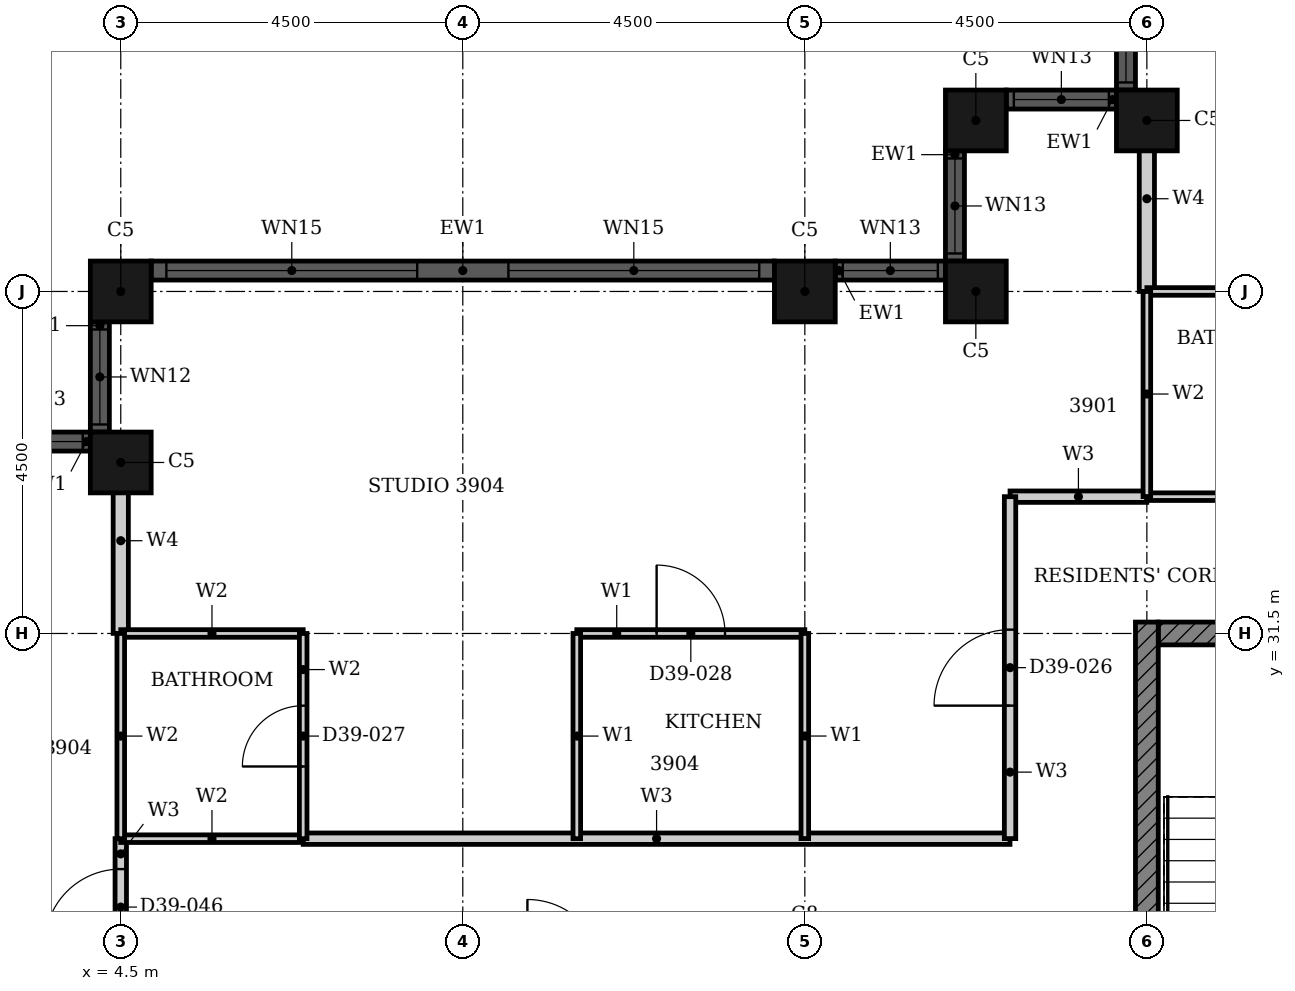
"""IFC4 building model, lengths in metres.
Left out: names, types, materials, properties, quantities, classifications, styles, units other than length and angle.
Written with IfcOpenShell. Run it as: python <this file> out.ifc"""

import sys

from ifc_helpers import new_model, si_unit, direction, frame, frame_2d, origin, origin_2d, place, context, subcontext, project, spatial, rectangle, hollow_rectangle, extrude, element, fill, save


model = new_model("IFC4")
c1 = context("Model", 3, precision=1e-05, world=origin(), true_north=direction((0.0, 1.0)))
c2 = subcontext(c1, "Body", "Model", "MODEL_VIEW")
j1 = project(units=[si_unit("LENGTHUNIT", "METRE"), si_unit("PLANEANGLEUNIT", "RADIAN")], contexts=[c1])
p1 = place(None, origin())
s1 = spatial("IfcSite", under=j1, at=p1, CompositionType="ELEMENT")
p2 = place(p1, origin())
s2 = spatial("IfcBuilding", under=s1, at=p2, CompositionType="ELEMENT")
p3 = place(p2, frame((0.0, 0.0, 158.0)))
s3 = spatial("IfcBuildingStorey", under=s2, at=p3, CompositionType="ELEMENT", Elevation=158.0)
for number, where, z_axis, x_axis in (
    (1, (18.0, 38.25, 0.0), (0.0, 0.0, 1.0), (1.0, 0.0, 0.0)),
    (2, (15.75, 38.25, 0.0), (0.0, 0.0, 1.0), (1.0, 0.0, 0.0)),
    (3, (15.75, 36.0, 0.0), (0.0, 0.0, 1.0), (1.0, 0.0, 0.0)),
    (4, (13.5, 36.0, 0.0), (0.0, 0.0, 1.0), (1.0, 0.0, 0.0)),
    (5, (4.5, 36.0, 0.0), (0.0, 0.0, 1.0), (1.0, 0.0, 0.0)),
    (6, (4.5, 33.75, 0.0), (0.0, 0.0, 1.0), (1.0, 0.0, 0.0)),
):
    element("IfcColumn", number, at=place(p3, frame(where, z_axis=z_axis, x_axis=x_axis)), inside=s3, PredefinedType="COLUMN", context=c2, shape_type="SweptSolid", body=[
        extrude(hollow_rectangle(XDim=0.8, YDim=0.8, WallThickness=0.025, at=origin_2d()), origin(), (0.0, 0.0, 1.0), 3.7),
    ])
p4 = place(p3, frame((17.725, 40.1, 0.0), z_axis=(0.0, 0.0, 1.0), x_axis=(0.0, -1.0, 0.0)))
e7 = element("IfcWall", 7, at=p4, inside=s3, PredefinedType="SOLIDWALL", context=c2, shape_type="SweptSolid", body=[
    extrude(rectangle(XDim=1.45, YDim=0.25, at=frame_2d((0.725, 0.0))), origin(), (0.0, 0.0, 1.0), 3.7),
])
p5 = place(p4, frame((0.1, 0.0, 0.9)))
e8 = element("IfcOpeningElement", 8, at=p5, cuts=e7, PredefinedType="OPENING", context=c2, shape_type="SweptSolid", body=[
    extrude(rectangle(XDim=1.25, YDim=1.85, at=frame_2d((0.625, 0.925))), frame((0.0, 0.135, 0.0), z_axis=(0.0, -1.0, 0.0), x_axis=(1.0, 0.0, 0.0)), (0.0, 0.0, 1.0), 0.27),
])
p6 = place(p3, frame((17.6, 38.525, 0.0), z_axis=(0.0, 0.0, 1.0), x_axis=(-1.0, 0.0, 0.0)))
e9 = element("IfcWall", 9, at=p6, inside=s3, PredefinedType="SOLIDWALL", context=c2, shape_type="SweptSolid", body=[
    extrude(rectangle(XDim=1.45, YDim=0.25, at=frame_2d((0.725, 0.0))), origin(), (0.0, 0.0, 1.0), 3.7),
])
p7 = place(p6, frame((0.1, 0.0, 0.9)))
e10 = element("IfcOpeningElement", 10, at=p7, cuts=e9, PredefinedType="OPENING", context=c2, shape_type="SweptSolid", body=[
    extrude(rectangle(XDim=1.25, YDim=1.85, at=frame_2d((0.625, 0.925))), frame((0.0, 0.135, 0.0), z_axis=(0.0, -1.0, 0.0), x_axis=(1.0, 0.0, 0.0)), (0.0, 0.0, 1.0), 0.27),
])
p8 = place(p3, frame((15.475, 37.85, 0.0), z_axis=(0.0, 0.0, 1.0), x_axis=(0.0, -1.0, 0.0)))
e11 = element("IfcWall", 11, at=p8, inside=s3, PredefinedType="SOLIDWALL", context=c2, shape_type="SweptSolid", body=[
    extrude(rectangle(XDim=1.45, YDim=0.25, at=frame_2d((0.725, 0.0))), origin(), (0.0, 0.0, 1.0), 3.7),
])
p9 = place(p8, frame((0.1, 0.0, 0.9)))
e12 = element("IfcOpeningElement", 12, at=p9, cuts=e11, PredefinedType="OPENING", context=c2, shape_type="SweptSolid", body=[
    extrude(rectangle(XDim=1.25, YDim=1.85, at=frame_2d((0.625, 0.925))), frame((0.0, 0.135, 0.0), z_axis=(0.0, -1.0, 0.0), x_axis=(1.0, 0.0, 0.0)), (0.0, 0.0, 1.0), 0.27),
])
p10 = place(p3, frame((15.35, 36.275, 0.0), z_axis=(0.0, 0.0, 1.0), x_axis=(-1.0, 0.0, 0.0)))
e13 = element("IfcWall", 13, at=p10, inside=s3, PredefinedType="SOLIDWALL", context=c2, shape_type="SweptSolid", body=[
    extrude(rectangle(XDim=1.45, YDim=0.25, at=frame_2d((0.725, 0.0))), origin(), (0.0, 0.0, 1.0), 3.7),
])
p11 = place(p10, frame((0.1, 0.0, 0.9)))
e14 = element("IfcOpeningElement", 14, at=p11, cuts=e13, PredefinedType="OPENING", context=c2, shape_type="SweptSolid", body=[
    extrude(rectangle(XDim=1.25, YDim=1.85, at=frame_2d((0.625, 0.925))), frame((0.0, 0.135, 0.0), z_axis=(0.0, -1.0, 0.0), x_axis=(1.0, 0.0, 0.0)), (0.0, 0.0, 1.0), 0.27),
])
p12 = place(p3, frame((13.1, 36.275, 0.0), z_axis=(0.0, 0.0, 1.0), x_axis=(-1.0, 0.0, 0.0)))
e15 = element("IfcWall", 15, at=p12, inside=s3, PredefinedType="SOLIDWALL", context=c2, shape_type="SweptSolid", body=[
    extrude(rectangle(XDim=8.2, YDim=0.25, at=frame_2d((4.1, 0.0))), origin(), (0.0, 0.0, 1.0), 3.7),
])
p13 = place(p12, frame((0.2, 0.0, 0.45)))
e16 = element("IfcOpeningElement", 16, at=p13, cuts=e15, PredefinedType="OPENING", context=c2, shape_type="SweptSolid", body=[
    extrude(rectangle(XDim=3.3, YDim=2.3, at=frame_2d((1.65, 1.15))), frame((0.0, 0.135, 0.0), z_axis=(0.0, -1.0, 0.0), x_axis=(1.0, 0.0, 0.0)), (0.0, 0.0, 1.0), 0.27),
])
p14 = place(p12, frame((4.7, 0.0, 0.45)))
e17 = element("IfcOpeningElement", 17, at=p14, cuts=e15, PredefinedType="OPENING", context=c2, shape_type="SweptSolid", body=[
    extrude(rectangle(XDim=3.3, YDim=2.3, at=frame_2d((1.65, 1.15))), frame((0.0, 0.135, 0.0), z_axis=(0.0, -1.0, 0.0), x_axis=(1.0, 0.0, 0.0)), (0.0, 0.0, 1.0), 0.27),
])
p15 = place(p3, frame((4.225, 35.6, 0.0), z_axis=(0.0, 0.0, 1.0), x_axis=(0.0, -1.0, 0.0)))
e18 = element("IfcWall", 18, at=p15, inside=s3, PredefinedType="SOLIDWALL", context=c2, shape_type="SweptSolid", body=[
    extrude(rectangle(XDim=1.45, YDim=0.25, at=frame_2d((0.725, 0.0))), origin(), (0.0, 0.0, 1.0), 3.7),
])
p16 = place(p15, frame((0.1, 0.0, 0.9)))
e19 = element("IfcOpeningElement", 19, at=p16, cuts=e18, PredefinedType="OPENING", context=c2, shape_type="SweptSolid", body=[
    extrude(rectangle(XDim=1.25, YDim=2.08, at=frame_2d((0.625, 1.04))), frame((0.0, 0.135, 0.0), z_axis=(0.0, -1.0, 0.0), x_axis=(1.0, 0.0, 0.0)), (0.0, 0.0, 1.0), 0.27),
])
p17 = place(p3, frame((4.1, 34.025, 0.0), z_axis=(0.0, 0.0, 1.0), x_axis=(-1.0, 0.0, 0.0)))
e20 = element("IfcWall", 20, at=p17, inside=s3, PredefinedType="SOLIDWALL", context=c2, shape_type="SweptSolid", body=[
    extrude(rectangle(XDim=1.45, YDim=0.25, at=frame_2d((0.725, 0.0))), origin(), (0.0, 0.0, 1.0), 3.7),
])
p18 = place(p17, frame((0.1, 0.0, 0.9)))
e21 = element("IfcOpeningElement", 21, at=p18, cuts=e20, PredefinedType="OPENING", context=c2, shape_type="SweptSolid", body=[
    extrude(rectangle(XDim=1.25, YDim=1.85, at=frame_2d((0.625, 0.925))), frame((0.0, 0.135, 0.0), z_axis=(0.0, -1.0, 0.0), x_axis=(1.0, 0.0, 0.0)), (0.0, 0.0, 1.0), 0.27),
])
p19 = place(p3, frame((18.15, 31.5, 0.0), z_axis=(0.0, 0.0, 1.0), x_axis=(1.0, 0.0, 0.0)))
e22 = element("IfcWall", 22, at=p19, inside=s3, PredefinedType="SHEAR", context=c2, shape_type="SweptSolid", body=[
    extrude(rectangle(XDim=9.368, YDim=0.3, at=frame_2d((4.684, 0.0))), origin(), (0.0, 0.0, 1.0), 3.4),
])
p20 = place(p19, frame((4.736, 0.0, 0.0)))
e23 = element("IfcOpeningElement", 23, at=p20, cuts=e22, PredefinedType="OPENING", context=c2, shape_type="SweptSolid", body=[
    extrude(rectangle(XDim=1.8, YDim=2.1, at=frame_2d((0.9, 1.05))), frame((0.0, 0.16, 0.0), z_axis=(0.0, -1.0, 0.0), x_axis=(1.0, 0.0, 0.0)), (0.0, 0.0, 1.0), 0.32),
])
p21 = place(p3, frame((18.0, 22.35, 0.0), z_axis=(0.0, 0.0, 1.0), x_axis=(0.0, 1.0, 0.0)))
e24 = element("IfcWall", 24, at=p21, inside=s3, PredefinedType="SHEAR", context=c2, shape_type="SweptSolid", body=[
    extrude(rectangle(XDim=9.3, YDim=0.3, at=frame_2d((4.65, 0.0))), origin(), (0.0, 0.0, 1.0), 3.4),
])
p22 = place(p3, frame((6.9, 28.8, 0.0), z_axis=(0.0, 0.0, 1.0), x_axis=(1.0, 0.0, 0.0)))
e25 = element("IfcWall", 25, at=p22, inside=s3, PredefinedType="PARTITIONING", context=c2, shape_type="SweptSolid", body=[
    extrude(rectangle(XDim=9.299, YDim=0.15, at=frame_2d((4.649, 0.0))), origin(), (0.0, 0.0, 1.0), 3.4),
])
p23 = place(p3, frame((16.2, 33.3, 0.0), z_axis=(0.0, 0.0, 1.0), x_axis=(1.0, 0.0, 0.0)))
e26 = element("IfcWall", 26, at=p23, inside=s3, PredefinedType="PARTITIONING", context=c2, shape_type="SweptSolid", body=[
    extrude(rectangle(XDim=1.799, YDim=0.15, at=frame_2d((0.899, 0.0))), origin(), (0.0, 0.0, 1.0), 3.4),
])
p24 = place(p3, frame((16.2, 28.801, 0.0), z_axis=(0.0, 0.0, 1.0), x_axis=(0.0, 1.0, 0.0)))
e27 = element("IfcWall", 27, at=p24, inside=s3, PredefinedType="PARTITIONING", context=c2, shape_type="SweptSolid", body=[
    extrude(rectangle(XDim=4.499, YDim=0.15, at=frame_2d((2.25, 0.0))), origin(), (0.0, 0.0, 1.0), 3.4),
])
p25 = place(p24, frame((1.75, 0.0, 0.0)))
e28 = element("IfcOpeningElement", 28, at=p25, cuts=e27, PredefinedType="OPENING", context=c2, shape_type="SweptSolid", body=[
    extrude(rectangle(XDim=1.0, YDim=2.2, at=frame_2d((0.5, 1.1))), frame((0.0, 0.085, 0.0), z_axis=(0.0, -1.0, 0.0), x_axis=(1.0, 0.0, 0.0)), (0.0, 0.0, 1.0), 0.17),
])
p26 = place(p3, frame((4.5, 27.0, 0.0), z_axis=(0.0, 0.0, 1.0), x_axis=(0.0, 1.0, 0.0)))
e29 = element("IfcWall", 29, at=p26, inside=s3, PredefinedType="PARTITIONING", context=c2, shape_type="SweptSolid", body=[
    extrude(rectangle(XDim=1.8, YDim=0.15, at=frame_2d((0.9, 0.0))), origin(), (0.0, 0.0, 1.0), 3.4),
])
p27 = place(p26, frame((0.4, 0.0, 0.0)))
e30 = element("IfcOpeningElement", 30, at=p27, cuts=e29, PredefinedType="OPENING", context=c2, shape_type="SweptSolid", body=[
    extrude(rectangle(XDim=1.0, YDim=2.2, at=frame_2d((0.5, 1.1))), frame((0.0, 0.085, 0.0), z_axis=(0.0, -1.0, 0.0), x_axis=(1.0, 0.0, 0.0)), (0.0, 0.0, 1.0), 0.17),
])
p28 = place(p3, frame((10.5, 31.5, 0.0), z_axis=(0.0, 0.0, 1.0), x_axis=(1.0, 0.0, 0.0)))
e31 = element("IfcWall", 31, at=p28, inside=s3, PredefinedType="PARTITIONING", context=c2, shape_type="SweptSolid", body=[
    extrude(rectangle(XDim=3.0, YDim=0.1, at=frame_2d((1.5, 0.0))), origin(), (0.0, 0.0, 1.0), 2.68),
])
p29 = place(p28, frame((1.05, 0.0, 0.0)))
e32 = element("IfcOpeningElement", 32, at=p29, cuts=e31, PredefinedType="OPENING", context=c2, shape_type="SweptSolid", body=[
    extrude(rectangle(XDim=0.9, YDim=2.1, at=frame_2d((0.45, 1.05))), frame((0.0, 0.06, 0.0), z_axis=(0.0, -1.0, 0.0), x_axis=(1.0, 0.0, 0.0)), (0.0, 0.0, 1.0), 0.12),
])
p30 = place(p3, frame((10.5, 28.8, 0.0), z_axis=(0.0, 0.0, 1.0), x_axis=(0.0, 1.0, 0.0)))
e33 = element("IfcWall", 33, at=p30, inside=s3, PredefinedType="PARTITIONING", context=c2, shape_type="SweptSolid", body=[
    extrude(rectangle(XDim=2.7, YDim=0.1, at=frame_2d((1.35, 0.0))), origin(), (0.0, 0.0, 1.0), 3.4),
])
p31 = place(p3, frame((13.5, 28.801, 0.0), z_axis=(0.0, 0.0, 1.0), x_axis=(0.0, 1.0, 0.0)))
e34 = element("IfcWall", 34, at=p31, inside=s3, PredefinedType="PARTITIONING", context=c2, shape_type="SweptSolid", body=[
    extrude(rectangle(XDim=2.699, YDim=0.1, at=frame_2d((1.35, 0.0))), origin(), (0.0, 0.0, 1.0), 2.48),
])
p32 = place(p3, frame((18.0, 36.0, 0.0), z_axis=(0.0, 0.0, 1.0), x_axis=(0.0, 1.0, 0.0)))
e35 = element("IfcWall", 35, at=p32, inside=s3, PredefinedType="PARTITIONING", context=c2, shape_type="SweptSolid", body=[
    extrude(rectangle(XDim=2.44, YDim=0.2, at=frame_2d((1.22, 0.0))), origin(), (0.0, 0.0, 1.0), 3.4),
])
p33 = place(p3, frame((4.5, 31.501, 0.0), z_axis=(0.0, 0.0, 1.0), x_axis=(0.0, 1.0, 0.0)))
e36 = element("IfcWall", 36, at=p33, inside=s3, PredefinedType="PARTITIONING", context=c2, shape_type="SweptSolid", body=[
    extrude(rectangle(XDim=2.439, YDim=0.2, at=frame_2d((1.219, 0.0))), origin(), (0.0, 0.0, 1.0), 3.4),
])
p34 = place(p3, frame((4.5, 28.8, 0.0), z_axis=(0.0, 0.0, 1.0), x_axis=(1.0, 0.0, 0.0)))
e37 = element("IfcWall", 37, at=p34, inside=s3, PredefinedType="PARTITIONING", context=c2, shape_type="SweptSolid", body=[
    extrude(rectangle(XDim=2.4, YDim=0.1, at=frame_2d((1.2, 0.0))), origin(), (0.0, 0.0, 1.0), 3.4),
])
p35 = place(p3, frame((4.5, 31.5, 0.0), z_axis=(0.0, 0.0, 1.0), x_axis=(1.0, 0.0, 0.0)))
e38 = element("IfcWall", 38, at=p35, inside=s3, PredefinedType="PARTITIONING", context=c2, shape_type="SweptSolid", body=[
    extrude(rectangle(XDim=2.4, YDim=0.1, at=frame_2d((1.2, 0.0))), origin(), (0.0, 0.0, 1.0), 2.68),
])
for number, where, z_axis, x_axis in (
    (39, (18.0, 33.3, 0.0), (0.0, 0.0, 1.0), (1.0, 0.0, 0.0)),
    (40, (18.0, 36.0, 0.0), (0.0, 0.0, 1.0), (1.0, 0.0, 0.0)),
):
    element("IfcWall", number, at=place(p3, frame(where, z_axis=z_axis, x_axis=x_axis)), inside=s3, PredefinedType="PARTITIONING", context=c2, shape_type="SweptSolid", body=[
        extrude(rectangle(XDim=2.4, YDim=0.1, at=frame_2d((1.2, 0.0))), origin(), (0.0, 0.0, 1.0), 3.4),
    ])
p36 = place(p3, frame((18.0, 33.301, 0.0), z_axis=(0.0, 0.0, 1.0), x_axis=(0.0, 1.0, 0.0)))
e41 = element("IfcWall", 41, at=p36, inside=s3, PredefinedType="PARTITIONING", context=c2, shape_type="SweptSolid", body=[
    extrude(rectangle(XDim=2.699, YDim=0.1, at=frame_2d((1.35, 0.0))), origin(), (0.0, 0.0, 1.0), 3.4),
])
p37 = place(p3, frame((4.5, 28.8, 0.0), z_axis=(0.0, 0.0, 1.0), x_axis=(0.0, 1.0, 0.0)))
e42 = element("IfcWall", 42, at=p37, inside=s3, PredefinedType="PARTITIONING", context=c2, shape_type="SweptSolid", body=[
    extrude(rectangle(XDim=2.7, YDim=0.1, at=frame_2d((1.35, 0.0))), origin(), (0.0, 0.0, 1.0), 3.4),
])
p38 = place(p3, frame((6.9, 28.8, 0.0), z_axis=(0.0, 0.0, 1.0), x_axis=(0.0, 1.0, 0.0)))
e43 = element("IfcWall", 43, at=p38, inside=s3, PredefinedType="PARTITIONING", context=c2, shape_type="SweptSolid", body=[
    extrude(rectangle(XDim=2.7, YDim=0.1, at=frame_2d((1.35, 0.0))), origin(), (0.0, 0.0, 1.0), 3.4),
])
p39 = place(p38, frame((0.95, 0.0, 0.0)))
e44 = element("IfcOpeningElement", 44, at=p39, cuts=e43, PredefinedType="OPENING", context=c2, shape_type="SweptSolid", body=[
    extrude(rectangle(XDim=0.8, YDim=2.1, at=frame_2d((0.4, 1.05))), frame((0.0, 0.06, 0.0), z_axis=(0.0, -1.0, 0.0), x_axis=(1.0, 0.0, 0.0)), (0.0, 0.0, 1.0), 0.12),
])
p40 = place(p5, origin())
e45 = element("IfcWindow", 45, at=p40, inside=s3, PartitioningType="SINGLE_PANEL", PredefinedType="WINDOW", context=c2, shape_type="SweptSolid", body=[
    extrude(rectangle(XDim=1.25, YDim=1.85, at=frame_2d((0.625, 0.925))), frame((0.0, 0.03, 0.0), z_axis=(0.0, -1.0, 0.0), x_axis=(1.0, 0.0, 0.0)), (0.0, 0.0, 1.0), 0.06),
])
fill(e8, e45)
p41 = place(p7, origin())
e46 = element("IfcWindow", 46, at=p41, inside=s3, PartitioningType="SINGLE_PANEL", PredefinedType="WINDOW", context=c2, shape_type="SweptSolid", body=[
    extrude(rectangle(XDim=1.25, YDim=1.85, at=frame_2d((0.625, 0.925))), frame((0.0, 0.03, 0.0), z_axis=(0.0, -1.0, 0.0), x_axis=(1.0, 0.0, 0.0)), (0.0, 0.0, 1.0), 0.06),
])
fill(e10, e46)
p42 = place(p9, origin())
e47 = element("IfcWindow", 47, at=p42, inside=s3, PartitioningType="SINGLE_PANEL", PredefinedType="WINDOW", context=c2, shape_type="SweptSolid", body=[
    extrude(rectangle(XDim=1.25, YDim=1.85, at=frame_2d((0.625, 0.925))), frame((0.0, 0.03, 0.0), z_axis=(0.0, -1.0, 0.0), x_axis=(1.0, 0.0, 0.0)), (0.0, 0.0, 1.0), 0.06),
])
fill(e12, e47)
p43 = place(p11, origin())
e48 = element("IfcWindow", 48, at=p43, inside=s3, PartitioningType="SINGLE_PANEL", PredefinedType="WINDOW", context=c2, shape_type="SweptSolid", body=[
    extrude(rectangle(XDim=1.25, YDim=1.85, at=frame_2d((0.625, 0.925))), frame((0.0, 0.03, 0.0), z_axis=(0.0, -1.0, 0.0), x_axis=(1.0, 0.0, 0.0)), (0.0, 0.0, 1.0), 0.06),
])
fill(e14, e48)
p44 = place(p13, origin())
e49 = element("IfcWindow", 49, at=p44, inside=s3, PartitioningType="SINGLE_PANEL", PredefinedType="WINDOW", context=c2, shape_type="SweptSolid", body=[
    extrude(rectangle(XDim=3.3, YDim=2.3, at=frame_2d((1.65, 1.15))), frame((0.0, 0.03, 0.0), z_axis=(0.0, -1.0, 0.0), x_axis=(1.0, 0.0, 0.0)), (0.0, 0.0, 1.0), 0.06),
])
fill(e16, e49)
p45 = place(p14, origin())
e50 = element("IfcWindow", 50, at=p45, inside=s3, PartitioningType="SINGLE_PANEL", PredefinedType="WINDOW", context=c2, shape_type="SweptSolid", body=[
    extrude(rectangle(XDim=3.3, YDim=2.3, at=frame_2d((1.65, 1.15))), frame((0.0, 0.03, 0.0), z_axis=(0.0, -1.0, 0.0), x_axis=(1.0, 0.0, 0.0)), (0.0, 0.0, 1.0), 0.06),
])
fill(e17, e50)
p46 = place(p16, origin())
e51 = element("IfcWindow", 51, at=p46, inside=s3, PartitioningType="SINGLE_PANEL", PredefinedType="WINDOW", context=c2, shape_type="SweptSolid", body=[
    extrude(rectangle(XDim=1.25, YDim=2.08, at=frame_2d((0.625, 1.04))), frame((0.0, 0.03, 0.0), z_axis=(0.0, -1.0, 0.0), x_axis=(1.0, 0.0, 0.0)), (0.0, 0.0, 1.0), 0.06),
])
fill(e19, e51)
p47 = place(p18, origin())
e52 = element("IfcWindow", 52, at=p47, inside=s3, PartitioningType="SINGLE_PANEL", PredefinedType="WINDOW", context=c2, shape_type="SweptSolid", body=[
    extrude(rectangle(XDim=1.25, YDim=1.85, at=frame_2d((0.625, 0.925))), frame((0.0, 0.03, 0.0), z_axis=(0.0, -1.0, 0.0), x_axis=(1.0, 0.0, 0.0)), (0.0, 0.0, 1.0), 0.06),
])
fill(e21, e52)
p48 = place(p25, origin())
e53 = element("IfcDoor", 53, at=p48, inside=s3, OperationType="SINGLE_SWING_LEFT", PredefinedType="DOOR", context=c2, shape_type="SweptSolid", body=[
    extrude(rectangle(XDim=1.0, YDim=2.2, at=frame_2d((0.5, 1.1))), frame((0.0, 0.025, 0.0), z_axis=(0.0, -1.0, 0.0), x_axis=(1.0, 0.0, 0.0)), (0.0, 0.0, 1.0), 0.05),
])
fill(e28, e53)
p49 = place(p39, origin())
e54 = element("IfcDoor", 54, at=p49, inside=s3, OperationType="SINGLE_SWING_RIGHT", PredefinedType="DOOR", context=c2, shape_type="SweptSolid", body=[
    extrude(rectangle(XDim=0.8, YDim=2.1, at=frame_2d((0.4, 1.05))), frame((0.0, 0.025, 0.0), z_axis=(0.0, -1.0, 0.0), x_axis=(1.0, 0.0, 0.0)), (0.0, 0.0, 1.0), 0.05),
])
fill(e44, e54)
p50 = place(p29, origin())
e55 = element("IfcDoor", 55, at=p50, inside=s3, OperationType="SINGLE_SWING_LEFT", PredefinedType="DOOR", context=c2, shape_type="SweptSolid", body=[
    extrude(rectangle(XDim=0.9, YDim=2.1, at=frame_2d((0.45, 1.05))), frame((0.0, 0.025, 0.0), z_axis=(0.0, -1.0, 0.0), x_axis=(1.0, 0.0, 0.0)), (0.0, 0.0, 1.0), 0.05),
])
fill(e32, e55)
p51 = place(p27, origin())
e56 = element("IfcDoor", 56, at=p51, inside=s3, OperationType="SINGLE_SWING_RIGHT", PredefinedType="DOOR", context=c2, shape_type="SweptSolid", body=[
    extrude(rectangle(XDim=1.0, YDim=2.2, at=frame_2d((0.5, 1.1))), frame((0.0, 0.025, 0.0), z_axis=(0.0, -1.0, 0.0), x_axis=(1.0, 0.0, 0.0)), (0.0, 0.0, 1.0), 0.05),
])
fill(e30, e56)
save(model, sys.argv[1])
